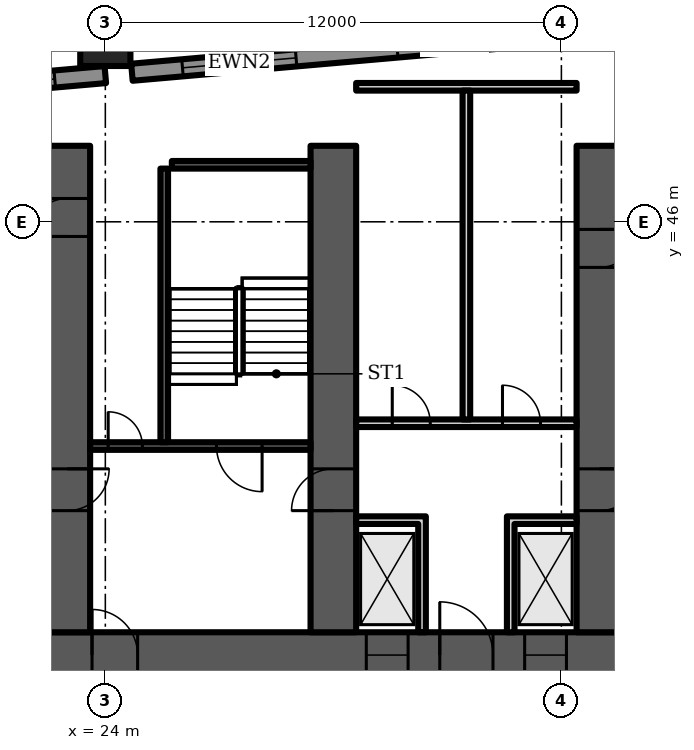
"""IFC4 building model, lengths in metres.
Left out: names, types, materials, properties, quantities, classifications, styles, units other than length and angle.
Written with IfcOpenShell. Run it as: python <this file> out.ifc"""

import sys

from ifc_helpers import new_model, si_unit, direction, frame, frame_2d, origin, origin_2d, place, context, subcontext, project, spatial, polyline, rectangle, outline, extrude, element, fill, save


model = new_model("IFC4")
c1 = context("Model", 3, precision=1e-05, world=origin(), true_north=direction((0.0, 1.0)))
c2 = subcontext(c1, "Body", "Model", "MODEL_VIEW")
j1 = project(units=[si_unit("LENGTHUNIT", "METRE"), si_unit("PLANEANGLEUNIT", "RADIAN")], contexts=[c1])
p1 = place(None, origin())
s1 = spatial("IfcSite", under=j1, at=p1, CompositionType="ELEMENT")
p2 = place(p1, origin())
s2 = spatial("IfcBuilding", under=s1, at=p2, CompositionType="ELEMENT")
p3 = place(p2, frame((0.0, 0.0, 15.0)))
s3 = spatial("IfcBuildingStorey", under=s2, at=p3, CompositionType="ELEMENT", Elevation=15.0)
p4 = place(p3, frame((24.0, 50.76, 0.0), z_axis=(0.0, 0.0, 1.0), x_axis=(1.0, 0.0, 0.0)))
e1 = element("IfcColumn", 1, at=p4, inside=s3, PredefinedType="COLUMN", context=c2, shape_type="SweptSolid", body=[
    extrude(rectangle(XDim=1.32, YDim=1.32, at=origin_2d()), origin(), (0.0, 0.0, 1.0), 6.5),
])
p5 = place(p3, frame((47.301, 50.11, 0.0), z_axis=(0.0, 0.0, 1.0), x_axis=(-0.996195, 0.087143, 0.0)))
e2 = element("IfcWall", 2, at=p5, inside=s3, PredefinedType="SOLIDWALL", context=c2, shape_type="SweptSolid", body=[
    extrude(rectangle(XDim=10.26, YDim=0.45, at=frame_2d((5.13, 0.0))), origin(), (0.0, 0.0, 1.0), 6.2),
])
p6 = place(p5, frame((1.065, 0.0, 1.0)))
e3 = element("IfcOpeningElement", 3, at=p6, cuts=e2, PredefinedType="OPENING", context=c2, shape_type="SweptSolid", body=[
    extrude(rectangle(XDim=3.0, YDim=4.2, at=frame_2d((1.5, 2.1))), frame((0.0, 0.235, 0.0), z_axis=(0.0, -1.0, 0.0), x_axis=(1.0, 0.0, 0.0)), (0.0, 0.0, 1.0), 0.47),
])
p7 = place(p5, frame((6.195, 0.0, 1.0)))
e4 = element("IfcOpeningElement", 4, at=p7, cuts=e2, PredefinedType="OPENING", context=c2, shape_type="SweptSolid", body=[
    extrude(rectangle(XDim=3.0, YDim=4.2, at=frame_2d((1.5, 2.1))), frame((0.0, 0.235, 0.0), z_axis=(0.0, -1.0, 0.0), x_axis=(1.0, 0.0, 0.0)), (0.0, 0.0, 1.0), 0.47),
])
p8 = place(p3, frame((36.0, 50.924, 0.0), z_axis=(0.0, 0.0, 1.0), x_axis=(-0.996195, -0.087145, 0.0)))
e5 = element("IfcWall", 5, at=p8, inside=s3, PredefinedType="SOLIDWALL", context=c2, shape_type="SweptSolid", body=[
    extrude(rectangle(XDim=11.344, YDim=0.45, at=frame_2d((5.672, 0.0))), origin(), (0.0, 0.0, 1.0), 6.2),
])
p9 = place(p8, frame((1.336, 0.0, 1.0)))
e6 = element("IfcOpeningElement", 6, at=p9, cuts=e5, PredefinedType="OPENING", context=c2, shape_type="SweptSolid", body=[
    extrude(rectangle(XDim=3.0, YDim=4.2, at=frame_2d((1.5, 2.1))), frame((0.0, 0.235, 0.0), z_axis=(0.0, -1.0, 0.0), x_axis=(1.0, 0.0, 0.0)), (0.0, 0.0, 1.0), 0.47),
])
p10 = place(p8, frame((7.008, 0.0, 1.0)))
e7 = element("IfcOpeningElement", 7, at=p10, cuts=e5, PredefinedType="OPENING", context=c2, shape_type="SweptSolid", body=[
    extrude(rectangle(XDim=3.0, YDim=4.2, at=frame_2d((1.5, 2.1))), frame((0.0, 0.235, 0.0), z_axis=(0.0, -1.0, 0.0), x_axis=(1.0, 0.0, 0.0)), (0.0, 0.0, 1.0), 0.47),
])
p11 = place(p3, frame((24.0, 49.874, 0.0), z_axis=(0.0, 0.0, 1.0), x_axis=(-0.996195, -0.087145, 0.0)))
e8 = element("IfcWall", 8, at=p11, inside=s3, PredefinedType="SOLIDWALL", context=c2, shape_type="SweptSolid", body=[
    extrude(rectangle(XDim=11.344, YDim=0.45, at=frame_2d((5.672, 0.0))), origin(), (0.0, 0.0, 1.0), 6.2),
])
p12 = place(p11, frame((1.336, 0.0, 1.0)))
e9 = element("IfcOpeningElement", 9, at=p12, cuts=e8, PredefinedType="OPENING", context=c2, shape_type="SweptSolid", body=[
    extrude(rectangle(XDim=3.0, YDim=4.2, at=frame_2d((1.5, 2.1))), frame((0.0, 0.235, 0.0), z_axis=(0.0, -1.0, 0.0), x_axis=(1.0, 0.0, 0.0)), (0.0, 0.0, 1.0), 0.47),
])
p13 = place(p11, frame((7.008, 0.0, 1.0)))
e10 = element("IfcOpeningElement", 10, at=p13, cuts=e8, PredefinedType="OPENING", context=c2, shape_type="SweptSolid", body=[
    extrude(rectangle(XDim=3.0, YDim=4.2, at=frame_2d((1.5, 2.1))), frame((0.0, 0.235, 0.0), z_axis=(0.0, -1.0, 0.0), x_axis=(1.0, 0.0, 0.0)), (0.0, 0.0, 1.0), 0.47),
])
p14 = place(p3, frame((9.0, 34.6, 0.0), z_axis=(0.0, 0.0, 1.0), x_axis=(1.0, 0.0, 0.0)))
e11 = element("IfcWall", 11, at=p14, inside=s3, PredefinedType="SHEAR", context=c2, shape_type="SweptSolid", body=[
    extrude(rectangle(XDim=56.0, YDim=1.2, at=frame_2d((28.0, 0.0))), origin(), (0.0, 0.0, 1.0), 6.2),
])
p15 = place(p14, frame((3.3, 0.0, 0.0)))
e12 = element("IfcOpeningElement", 12, at=p15, cuts=e11, PredefinedType="OPENING", context=c2, shape_type="SweptSolid", body=[
    extrude(rectangle(XDim=1.0, YDim=2.1, at=frame_2d((0.5, 1.05))), frame((0.0, 0.61, 0.0), z_axis=(0.0, -1.0, 0.0), x_axis=(1.0, 0.0, 0.0)), (0.0, 0.0, 1.0), 1.22),
])
p16 = place(p14, frame((7.867, 0.0, 0.0)))
e13 = element("IfcOpeningElement", 13, at=p16, cuts=e11, PredefinedType="OPENING", context=c2, shape_type="SweptSolid", body=[
    extrude(rectangle(XDim=1.1, YDim=2.1, at=frame_2d((0.55, 1.05))), frame((0.0, 0.61, 0.0), z_axis=(0.0, -1.0, 0.0), x_axis=(1.0, 0.0, 0.0)), (0.0, 0.0, 1.0), 1.22),
])
p17 = place(p14, frame((12.033, 0.0, 0.0)))
e14 = element("IfcOpeningElement", 14, at=p17, cuts=e11, PredefinedType="OPENING", context=c2, shape_type="SweptSolid", body=[
    extrude(rectangle(XDim=1.1, YDim=2.1, at=frame_2d((0.55, 1.05))), frame((0.0, 0.61, 0.0), z_axis=(0.0, -1.0, 0.0), x_axis=(1.0, 0.0, 0.0)), (0.0, 0.0, 1.0), 1.22),
])
p18 = place(p14, frame((9.8, 0.0, 0.0)))
e15 = element("IfcOpeningElement", 15, at=p18, cuts=e11, PredefinedType="OPENING", context=c2, shape_type="SweptSolid", body=[
    extrude(rectangle(XDim=1.4, YDim=2.1, at=frame_2d((0.7, 1.05))), frame((0.0, 0.61, 0.0), z_axis=(0.0, -1.0, 0.0), x_axis=(1.0, 0.0, 0.0)), (0.0, 0.0, 1.0), 1.22),
])
p19 = place(p14, frame((14.65, 0.0, 0.0)))
e16 = element("IfcOpeningElement", 16, at=p19, cuts=e11, PredefinedType="OPENING", context=c2, shape_type="SweptSolid", body=[
    extrude(rectangle(XDim=1.2, YDim=2.1, at=frame_2d((0.6, 1.05))), frame((0.0, 0.61, 0.0), z_axis=(0.0, -1.0, 0.0), x_axis=(1.0, 0.0, 0.0)), (0.0, 0.0, 1.0), 1.22),
])
p20 = place(p14, frame((21.867, 0.0, 0.0)))
e17 = element("IfcOpeningElement", 17, at=p20, cuts=e11, PredefinedType="OPENING", context=c2, shape_type="SweptSolid", body=[
    extrude(rectangle(XDim=1.1, YDim=2.1, at=frame_2d((0.55, 1.05))), frame((0.0, 0.61, 0.0), z_axis=(0.0, -1.0, 0.0), x_axis=(1.0, 0.0, 0.0)), (0.0, 0.0, 1.0), 1.22),
])
p21 = place(p14, frame((26.033, 0.0, 0.0)))
e18 = element("IfcOpeningElement", 18, at=p21, cuts=e11, PredefinedType="OPENING", context=c2, shape_type="SweptSolid", body=[
    extrude(rectangle(XDim=1.1, YDim=2.1, at=frame_2d((0.55, 1.05))), frame((0.0, 0.61, 0.0), z_axis=(0.0, -1.0, 0.0), x_axis=(1.0, 0.0, 0.0)), (0.0, 0.0, 1.0), 1.22),
])
p22 = place(p14, frame((23.8, 0.0, 0.0)))
e19 = element("IfcOpeningElement", 19, at=p22, cuts=e11, PredefinedType="OPENING", context=c2, shape_type="SweptSolid", body=[
    extrude(rectangle(XDim=1.4, YDim=2.1, at=frame_2d((0.7, 1.05))), frame((0.0, 0.61, 0.0), z_axis=(0.0, -1.0, 0.0), x_axis=(1.0, 0.0, 0.0)), (0.0, 0.0, 1.0), 1.22),
])
p23 = place(p14, frame((28.867, 0.0, 0.0)))
e20 = element("IfcOpeningElement", 20, at=p23, cuts=e11, PredefinedType="OPENING", context=c2, shape_type="SweptSolid", body=[
    extrude(rectangle(XDim=1.1, YDim=2.1, at=frame_2d((0.55, 1.05))), frame((0.0, 0.61, 0.0), z_axis=(0.0, -1.0, 0.0), x_axis=(1.0, 0.0, 0.0)), (0.0, 0.0, 1.0), 1.22),
])
p24 = place(p14, frame((33.033, 0.0, 0.0)))
e21 = element("IfcOpeningElement", 21, at=p24, cuts=e11, PredefinedType="OPENING", context=c2, shape_type="SweptSolid", body=[
    extrude(rectangle(XDim=1.1, YDim=2.1, at=frame_2d((0.55, 1.05))), frame((0.0, 0.61, 0.0), z_axis=(0.0, -1.0, 0.0), x_axis=(1.0, 0.0, 0.0)), (0.0, 0.0, 1.0), 1.22),
])
p25 = place(p14, frame((40.15, 0.0, 0.0)))
e22 = element("IfcOpeningElement", 22, at=p25, cuts=e11, PredefinedType="OPENING", context=c2, shape_type="SweptSolid", body=[
    extrude(rectangle(XDim=1.2, YDim=2.1, at=frame_2d((0.6, 1.05))), frame((0.0, 0.61, 0.0), z_axis=(0.0, -1.0, 0.0), x_axis=(1.0, 0.0, 0.0)), (0.0, 0.0, 1.0), 1.22),
])
p26 = place(p14, frame((44.8, 0.0, 0.0)))
e23 = element("IfcOpeningElement", 23, at=p26, cuts=e11, PredefinedType="OPENING", context=c2, shape_type="SweptSolid", body=[
    extrude(rectangle(XDim=1.4, YDim=2.1, at=frame_2d((0.7, 1.05))), frame((0.0, 0.61, 0.0), z_axis=(0.0, -1.0, 0.0), x_axis=(1.0, 0.0, 0.0)), (0.0, 0.0, 1.0), 1.22),
])
p27 = place(p14, frame((49.867, 0.0, 0.0)))
e24 = element("IfcOpeningElement", 24, at=p27, cuts=e11, PredefinedType="OPENING", context=c2, shape_type="SweptSolid", body=[
    extrude(rectangle(XDim=1.1, YDim=2.1, at=frame_2d((0.55, 1.05))), frame((0.0, 0.61, 0.0), z_axis=(0.0, -1.0, 0.0), x_axis=(1.0, 0.0, 0.0)), (0.0, 0.0, 1.0), 1.22),
])
p28 = place(p14, frame((53.5, 0.0, 0.0)))
e25 = element("IfcOpeningElement", 25, at=p28, cuts=e11, PredefinedType="OPENING", context=c2, shape_type="SweptSolid", body=[
    extrude(rectangle(XDim=1.1, YDim=2.1, at=frame_2d((0.55, 1.05))), frame((0.0, 0.61, 0.0), z_axis=(0.0, -1.0, 0.0), x_axis=(1.0, 0.0, 0.0)), (0.0, 0.0, 1.0), 1.22),
])
p29 = place(p14, frame((51.567, 0.0, 0.0)))
e26 = element("IfcOpeningElement", 26, at=p29, cuts=e11, PredefinedType="OPENING", context=c2, shape_type="SweptSolid", body=[
    extrude(rectangle(XDim=1.4, YDim=2.1, at=frame_2d((0.7, 1.05))), frame((0.0, 0.61, 0.0), z_axis=(0.0, -1.0, 0.0), x_axis=(1.0, 0.0, 0.0)), (0.0, 0.0, 1.0), 1.22),
])
p30 = place(p3, frame((23.0, 35.2, 0.0), z_axis=(0.0, 0.0, 1.0), x_axis=(0.0, 1.0, 0.0)))
e27 = element("IfcWall", 27, at=p30, inside=s3, PredefinedType="SHEAR", context=c2, shape_type="SweptSolid", body=[
    extrude(rectangle(XDim=12.8, YDim=1.2, at=frame_2d((6.4, 0.0))), origin(), (0.0, 0.0, 1.0), 6.2),
])
p31 = place(p30, frame((10.414, 0.0, 0.0)))
e28 = element("IfcOpeningElement", 28, at=p31, cuts=e27, PredefinedType="OPENING", context=c2, shape_type="SweptSolid", body=[
    extrude(rectangle(XDim=1.0, YDim=2.1, at=frame_2d((0.5, 1.05))), frame((0.0, 0.61, 0.0), z_axis=(0.0, -1.0, 0.0), x_axis=(1.0, 0.0, 0.0)), (0.0, 0.0, 1.0), 1.22),
])
p32 = place(p30, frame((3.2, 0.0, 0.0)))
e29 = element("IfcOpeningElement", 29, at=p32, cuts=e27, PredefinedType="OPENING", context=c2, shape_type="SweptSolid", body=[
    extrude(rectangle(XDim=1.1, YDim=2.1, at=frame_2d((0.55, 1.05))), frame((0.0, 0.61, 0.0), z_axis=(0.0, -1.0, 0.0), x_axis=(1.0, 0.0, 0.0)), (0.0, 0.0, 1.0), 1.22),
])
p33 = place(p3, frame((30.0, 35.2, 0.0), z_axis=(0.0, 0.0, 1.0), x_axis=(0.0, 1.0, 0.0)))
e30 = element("IfcWall", 30, at=p33, inside=s3, PredefinedType="SHEAR", context=c2, shape_type="SweptSolid", body=[
    extrude(rectangle(XDim=12.8, YDim=1.2, at=frame_2d((6.4, 0.0))), origin(), (0.0, 0.0, 1.0), 6.2),
])
p34 = place(p33, frame((3.2, 0.0, 0.0)))
e31 = element("IfcOpeningElement", 31, at=p34, cuts=e30, PredefinedType="OPENING", context=c2, shape_type="SweptSolid", body=[
    extrude(rectangle(XDim=1.1, YDim=2.1, at=frame_2d((0.55, 1.05))), frame((0.0, 0.61, 0.0), z_axis=(0.0, -1.0, 0.0), x_axis=(1.0, 0.0, 0.0)), (0.0, 0.0, 1.0), 1.22),
])
p35 = place(p3, frame((37.0, 35.2, 0.0), z_axis=(0.0, 0.0, 1.0), x_axis=(0.0, 1.0, 0.0)))
e32 = element("IfcWall", 32, at=p35, inside=s3, PredefinedType="SHEAR", context=c2, shape_type="SweptSolid", body=[
    extrude(rectangle(XDim=12.8, YDim=1.2, at=frame_2d((6.4, 0.0))), origin(), (0.0, 0.0, 1.0), 6.2),
])
p36 = place(p35, frame((3.2, 0.0, 0.0)))
e33 = element("IfcOpeningElement", 33, at=p36, cuts=e32, PredefinedType="OPENING", context=c2, shape_type="SweptSolid", body=[
    extrude(rectangle(XDim=1.1, YDim=2.1, at=frame_2d((0.55, 1.05))), frame((0.0, 0.61, 0.0), z_axis=(0.0, -1.0, 0.0), x_axis=(1.0, 0.0, 0.0)), (0.0, 0.0, 1.0), 1.22),
])
p37 = place(p35, frame((9.6, 0.0, 0.0)))
e34 = element("IfcOpeningElement", 34, at=p37, cuts=e32, PredefinedType="OPENING", context=c2, shape_type="SweptSolid", body=[
    extrude(rectangle(XDim=1.0, YDim=2.1, at=frame_2d((0.5, 1.05))), frame((0.0, 0.61, 0.0), z_axis=(0.0, -1.0, 0.0), x_axis=(1.0, 0.0, 0.0)), (0.0, 0.0, 1.0), 1.22),
])
p38 = place(p3, frame((23.6, 40.1, 0.0), z_axis=(0.0, 0.0, 1.0), x_axis=(1.0, 0.0, 0.0)))
e35 = element("IfcWall", 35, at=p38, inside=s3, PredefinedType="SHEAR", context=c2, shape_type="SweptSolid", body=[
    extrude(rectangle(XDim=5.8, YDim=0.2, at=frame_2d((2.9, 0.0))), origin(), (0.0, 0.0, 1.0), 6.2),
])
p39 = place(p38, frame((3.325, 0.0, 0.0)))
e36 = element("IfcOpeningElement", 36, at=p39, cuts=e35, PredefinedType="OPENING", context=c2, shape_type="SweptSolid", body=[
    extrude(rectangle(XDim=1.2, YDim=2.1, at=frame_2d((0.6, 1.05))), frame((0.0, 0.11, 0.0), z_axis=(0.0, -1.0, 0.0), x_axis=(1.0, 0.0, 0.0)), (0.0, 0.0, 1.0), 0.22),
])
p40 = place(p38, frame((0.475, 0.0, 0.0)))
e37 = element("IfcOpeningElement", 37, at=p40, cuts=e35, PredefinedType="OPENING", context=c2, shape_type="SweptSolid", body=[
    extrude(rectangle(XDim=0.9, YDim=2.1, at=frame_2d((0.45, 1.05))), frame((0.0, 0.11, 0.0), z_axis=(0.0, -1.0, 0.0), x_axis=(1.0, 0.0, 0.0)), (0.0, 0.0, 1.0), 0.22),
])
p41 = place(p3, frame((25.55, 40.2, 0.0), z_axis=(0.0, 0.0, 1.0), x_axis=(0.0, 1.0, 0.0)))
e38 = element("IfcWall", 38, at=p41, inside=s3, PredefinedType="SHEAR", context=c2, shape_type="SweptSolid", body=[
    extrude(rectangle(XDim=7.2, YDim=0.2, at=frame_2d((3.6, 0.0))), origin(), (0.0, 0.0, 1.0), 6.2),
])
p42 = place(p3, frame((25.75, 47.5, 0.0), z_axis=(0.0, 0.0, 1.0), x_axis=(1.0, 0.0, 0.0)))
e39 = element("IfcWall", 39, at=p42, inside=s3, PredefinedType="SHEAR", context=c2, shape_type="SweptSolid", body=[
    extrude(rectangle(XDim=3.65, YDim=0.2, at=frame_2d((1.825, 0.0))), origin(), (0.0, 0.0, 1.0), 6.2),
])
p43 = place(p3, frame((30.6, 40.7, 0.0), z_axis=(0.0, 0.0, 1.0), x_axis=(1.0, 0.0, 0.0)))
e40 = element("IfcWall", 40, at=p43, inside=s3, PredefinedType="PARTITIONING", context=c2, shape_type="SweptSolid", body=[
    extrude(rectangle(XDim=5.8, YDim=0.2, at=frame_2d((2.9, 0.0))), origin(), (0.0, 0.0, 1.0), 6.2),
])
p44 = place(p43, frame((0.95, 0.0, 0.0)))
e41 = element("IfcOpeningElement", 41, at=p44, cuts=e40, PredefinedType="OPENING", context=c2, shape_type="SweptSolid", body=[
    extrude(rectangle(XDim=1.0, YDim=2.1, at=frame_2d((0.5, 1.05))), frame((0.0, 0.11, 0.0), z_axis=(0.0, -1.0, 0.0), x_axis=(1.0, 0.0, 0.0)), (0.0, 0.0, 1.0), 0.22),
])
p45 = place(p43, frame((3.85, 0.0, 0.0)))
e42 = element("IfcOpeningElement", 42, at=p45, cuts=e40, PredefinedType="OPENING", context=c2, shape_type="SweptSolid", body=[
    extrude(rectangle(XDim=1.0, YDim=2.1, at=frame_2d((0.5, 1.05))), frame((0.0, 0.11, 0.0), z_axis=(0.0, -1.0, 0.0), x_axis=(1.0, 0.0, 0.0)), (0.0, 0.0, 1.0), 0.22),
])
p46 = place(p3, frame((0.0, 0.0, -0.0)))
e43 = element("IfcWall", 43, at=p46, inside=s3, PredefinedType="PARTITIONING", context=c2, shape_type="SweptSolid", body=[
    extrude(outline(polyline([(32.233, 38.05), (30.6, 38.05), (30.6, 38.25), (32.233, 38.25), (32.433, 38.25), (32.433, 35.2), (32.233, 35.2), (32.233, 38.05)])), origin(), (0.0, 0.0, 1.0), 6.2),
])
p47 = place(p3, frame((0.0, 0.0, -0.0)))
e44 = element("IfcWall", 44, at=p47, inside=s3, PredefinedType="PARTITIONING", context=c2, shape_type="SweptSolid", body=[
    extrude(outline(polyline([(34.567, 38.25), (34.767, 38.25), (36.4, 38.25), (36.4, 38.05), (34.767, 38.05), (34.767, 35.2), (34.567, 35.2), (34.567, 38.25)])), origin(), (0.0, 0.0, 1.0), 6.2),
])
p48 = place(p3, frame((30.6, 49.552, 0.0), z_axis=(0.0, 0.0, 1.0), x_axis=(1.0, 0.0, 0.0)))
e45 = element("IfcWall", 45, at=p48, inside=s3, PredefinedType="PARTITIONING", context=c2, shape_type="SweptSolid", body=[
    extrude(rectangle(XDim=5.8, YDim=0.2, at=frame_2d((2.9, 0.0))), origin(), (0.0, 0.0, 1.0), 6.2),
])
p49 = place(p3, frame((33.5, 40.8, 0.0), z_axis=(0.0, 0.0, 1.0), x_axis=(0.0, 1.0, 0.0)))
e46 = element("IfcWall", 46, at=p49, inside=s3, PredefinedType="PARTITIONING", context=c2, shape_type="SweptSolid", body=[
    extrude(rectangle(XDim=8.653, YDim=0.2, at=frame_2d((4.326, 0.0))), origin(), (0.0, 0.0, 1.0), 6.2),
])
p50 = place(p9, origin())
e47 = element("IfcWindow", 47, at=p50, inside=s3, PartitioningType="SINGLE_PANEL", PredefinedType="WINDOW", context=c2, shape_type="SweptSolid", body=[
    extrude(rectangle(XDim=3.0, YDim=4.2, at=frame_2d((1.5, 2.1))), frame((0.0, 0.105, 0.0), z_axis=(0.0, -1.0, 0.0), x_axis=(1.0, 0.0, 0.0)), (0.0, 0.0, 1.0), 0.06),
])
fill(e6, e47)
p51 = place(p10, origin())
e48 = element("IfcWindow", 48, at=p51, inside=s3, PartitioningType="SINGLE_PANEL", PredefinedType="WINDOW", context=c2, shape_type="SweptSolid", body=[
    extrude(rectangle(XDim=3.0, YDim=4.2, at=frame_2d((1.5, 2.1))), frame((0.0, 0.105, 0.0), z_axis=(0.0, -1.0, 0.0), x_axis=(1.0, 0.0, 0.0)), (0.0, 0.0, 1.0), 0.06),
])
fill(e7, e48)
p52 = place(p12, origin())
e49 = element("IfcWindow", 49, at=p52, inside=s3, PartitioningType="SINGLE_PANEL", PredefinedType="WINDOW", context=c2, shape_type="SweptSolid", body=[
    extrude(rectangle(XDim=3.0, YDim=4.2, at=frame_2d((1.5, 2.1))), frame((0.0, 0.105, 0.0), z_axis=(0.0, -1.0, 0.0), x_axis=(1.0, 0.0, 0.0)), (0.0, 0.0, 1.0), 0.06),
])
fill(e9, e49)
p53 = place(p31, origin())
e50 = element("IfcDoor", 50, at=p53, inside=s3, OperationType="SINGLE_SWING_LEFT", PredefinedType="DOOR", context=c2, shape_type="SweptSolid", body=[
    extrude(rectangle(XDim=1.0, YDim=2.1, at=frame_2d((0.5, 1.05))), frame((0.0, 0.6, 0.0), z_axis=(0.0, -1.0, 0.0), x_axis=(1.0, 0.0, 0.0)), (0.0, 0.0, 1.0), 1.199),
])
fill(e28, e50)
p54 = place(p39, origin())
e51 = element("IfcDoor", 51, at=p54, inside=s3, OperationType="SINGLE_SWING_RIGHT", PredefinedType="DOOR", context=c2, shape_type="SweptSolid", body=[
    extrude(rectangle(XDim=1.2, YDim=2.1, at=frame_2d((0.6, 1.05))), frame((0.0, 0.025, 0.0), z_axis=(0.0, -1.0, 0.0), x_axis=(1.0, 0.0, 0.0)), (0.0, 0.0, 1.0), 0.05),
])
fill(e36, e51)
p55 = place(p40, origin())
e52 = element("IfcDoor", 52, at=p55, inside=s3, OperationType="SINGLE_SWING_LEFT", PredefinedType="DOOR", context=c2, shape_type="SweptSolid", body=[
    extrude(rectangle(XDim=0.9, YDim=2.1, at=frame_2d((0.45, 1.05))), frame((0.0, 0.025, 0.0), z_axis=(0.0, -1.0, 0.0), x_axis=(1.0, 0.0, 0.0)), (0.0, 0.0, 1.0), 0.05),
])
fill(e37, e52)
p56 = place(p19, origin())
e53 = element("IfcDoor", 53, at=p56, inside=s3, OperationType="SINGLE_SWING_LEFT", PredefinedType="DOOR", context=c2, shape_type="SweptSolid", body=[
    extrude(rectangle(XDim=1.2, YDim=2.1, at=frame_2d((0.6, 1.05))), frame((0.0, 0.025, 0.0), z_axis=(0.0, -1.0, 0.0), x_axis=(1.0, 0.0, 0.0)), (0.0, 0.0, 1.0), 0.05),
])
fill(e16, e53)
p57 = place(p20, origin())
e54 = element("IfcDoor", 54, at=p57, inside=s3, OperationType="DOUBLE_DOOR_SLIDING", PredefinedType="DOOR", context=c2, shape_type="SweptSolid", body=[
    extrude(rectangle(XDim=1.1, YDim=2.1, at=frame_2d((0.55, 1.05))), frame((0.0, 0.025, 0.0), z_axis=(0.0, -1.0, 0.0), x_axis=(1.0, 0.0, 0.0)), (0.0, 0.0, 1.0), 0.05),
])
fill(e17, e54)
p58 = place(p21, origin())
e55 = element("IfcDoor", 55, at=p58, inside=s3, OperationType="DOUBLE_DOOR_SLIDING", PredefinedType="DOOR", context=c2, shape_type="SweptSolid", body=[
    extrude(rectangle(XDim=1.1, YDim=2.1, at=frame_2d((0.55, 1.05))), frame((0.0, 0.025, 0.0), z_axis=(0.0, -1.0, 0.0), x_axis=(1.0, 0.0, 0.0)), (0.0, 0.0, 1.0), 0.05),
])
fill(e18, e55)
p59 = place(p22, origin())
e56 = element("IfcDoor", 56, at=p59, inside=s3, OperationType="DOUBLE_DOOR_SINGLE_SWING", PredefinedType="DOOR", context=c2, shape_type="SweptSolid", body=[
    extrude(rectangle(XDim=1.4, YDim=2.1, at=frame_2d((0.7, 1.05))), frame((0.0, 0.025, 0.0), z_axis=(0.0, -1.0, 0.0), x_axis=(1.0, 0.0, 0.0)), (0.0, 0.0, 1.0), 0.05),
])
fill(e19, e56)
p60 = place(p44, origin())
e57 = element("IfcDoor", 57, at=p60, inside=s3, OperationType="SINGLE_SWING_LEFT", PredefinedType="DOOR", context=c2, shape_type="SweptSolid", body=[
    extrude(rectangle(XDim=1.0, YDim=2.1, at=frame_2d((0.5, 1.05))), frame((0.0, 0.025, 0.0), z_axis=(0.0, -1.0, 0.0), x_axis=(1.0, 0.0, 0.0)), (0.0, 0.0, 1.0), 0.05),
])
fill(e41, e57)
p61 = place(p45, origin())
e58 = element("IfcDoor", 58, at=p61, inside=s3, OperationType="SINGLE_SWING_LEFT", PredefinedType="DOOR", context=c2, shape_type="SweptSolid", body=[
    extrude(rectangle(XDim=1.0, YDim=2.1, at=frame_2d((0.5, 1.05))), frame((0.0, 0.025, 0.0), z_axis=(0.0, -1.0, 0.0), x_axis=(1.0, 0.0, 0.0)), (0.0, 0.0, 1.0), 0.05),
])
fill(e42, e58)
p62 = place(p32, origin())
e59 = element("IfcDoor", 59, at=p62, inside=s3, OperationType="SINGLE_SWING_RIGHT", PredefinedType="DOOR", context=c2, shape_type="SweptSolid", body=[
    extrude(rectangle(XDim=1.1, YDim=2.1, at=frame_2d((0.55, 1.05))), frame((0.0, 0.025, 0.0), z_axis=(0.0, -1.0, 0.0), x_axis=(1.0, 0.0, 0.0)), (0.0, 0.0, 1.0), 0.05),
])
fill(e29, e59)
p63 = place(p34, origin())
e60 = element("IfcDoor", 60, at=p63, inside=s3, OperationType="SINGLE_SWING_LEFT", PredefinedType="DOOR", context=c2, shape_type="SweptSolid", body=[
    extrude(rectangle(XDim=1.1, YDim=2.1, at=frame_2d((0.55, 1.05))), frame((0.0, 0.025, 0.0), z_axis=(0.0, -1.0, 0.0), x_axis=(1.0, 0.0, 0.0)), (0.0, 0.0, 1.0), 0.05),
])
fill(e31, e60)
p64 = place(p36, origin())
e61 = element("IfcDoor", 61, at=p64, inside=s3, OperationType="SINGLE_SWING_RIGHT", PredefinedType="DOOR", context=c2, shape_type="SweptSolid", body=[
    extrude(rectangle(XDim=1.1, YDim=2.1, at=frame_2d((0.55, 1.05))), frame((0.0, 0.025, 0.0), z_axis=(0.0, -1.0, 0.0), x_axis=(1.0, 0.0, 0.0)), (0.0, 0.0, 1.0), 0.05),
])
fill(e33, e61)
p65 = place(p37, origin())
e62 = element("IfcDoor", 62, at=p65, inside=s3, OperationType="SINGLE_SWING_RIGHT", PredefinedType="DOOR", context=c2, shape_type="SweptSolid", body=[
    extrude(rectangle(XDim=1.0, YDim=2.1, at=frame_2d((0.5, 1.05))), frame((0.0, 0.6, 0.0), z_axis=(0.0, -1.0, 0.0), x_axis=(1.0, 0.0, 0.0)), (0.0, 0.0, 1.0), 1.199),
])
fill(e34, e62)
save(model, sys.argv[1])
